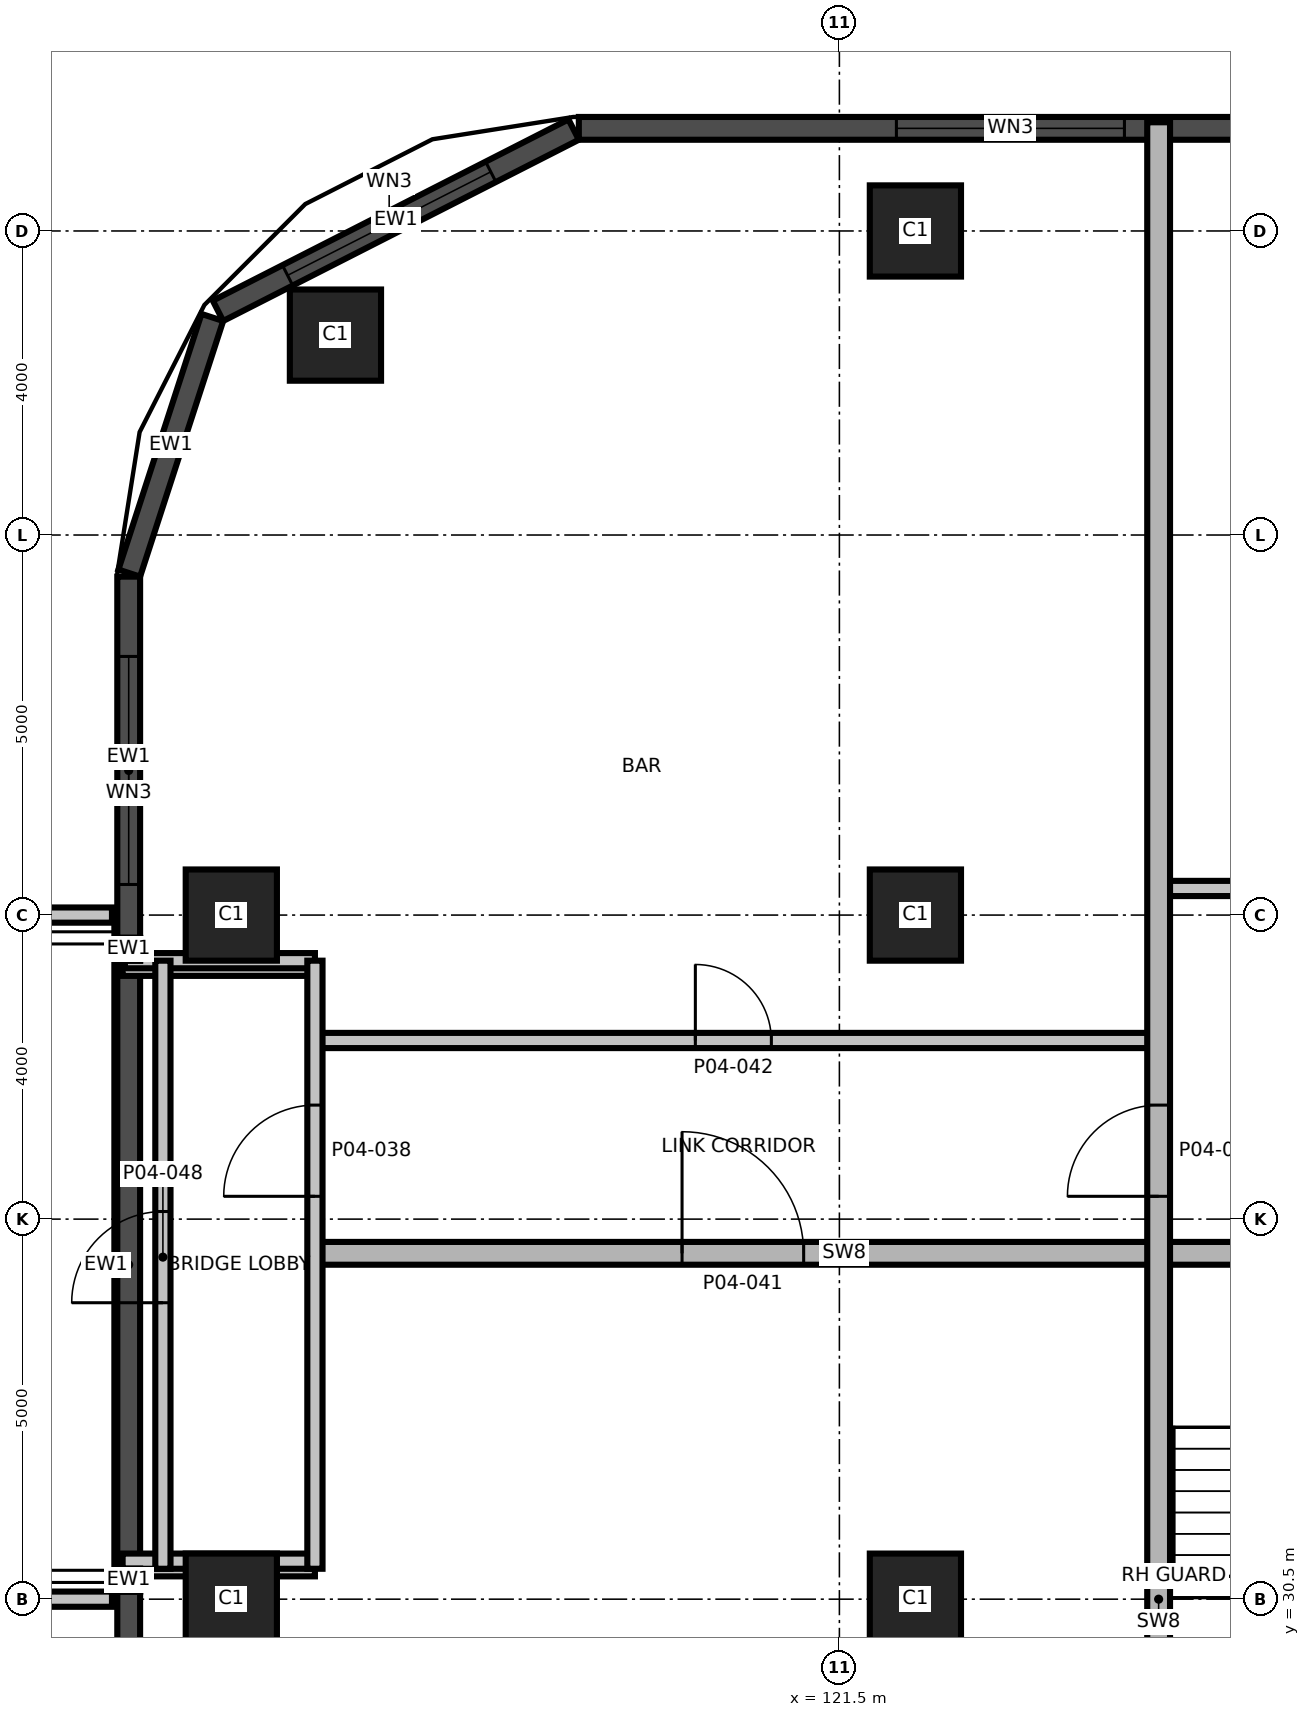
"""IFC4 building model, lengths in metres.
Left out: names, types, materials, properties, quantities, classifications, styles, units other than length and angle.
Written with IfcOpenShell. Run it as: python <this file> out.ifc"""

import sys

from ifc_helpers import new_model, si_unit, direction, frame, frame_2d, origin, origin_2d, place, context, subcontext, project, spatial, rectangle, extrude, element, fill, save


model = new_model("IFC4")
c1 = context("Model", 3, precision=1e-05, world=origin(), true_north=direction((0.0, 1.0)))
c2 = subcontext(c1, "Body", "Model", "MODEL_VIEW")
j1 = project(units=[si_unit("LENGTHUNIT", "METRE"), si_unit("PLANEANGLEUNIT", "RADIAN")], contexts=[c1])
p1 = place(None, origin())
s1 = spatial("IfcSite", under=j1, at=p1, CompositionType="ELEMENT")
p2 = place(p1, origin())
s2 = spatial("IfcBuilding", under=s1, at=p2, CompositionType="ELEMENT")
p3 = place(p2, frame((0.0, 0.0, 23.5)))
s3 = spatial("IfcBuildingStorey", under=s2, at=p3, CompositionType="ELEMENT", Elevation=23.5)
for number, where, z_axis, x_axis in (
    (1, (113.5, 30.5, 0.0), (0.0, 0.0, 1.0), (1.0, 0.0, 0.0)),
    (2, (122.5, 30.5, 0.0), (0.0, 0.0, 1.0), (1.0, 0.0, 0.0)),
    (3, (113.5, 39.5, 0.0), (0.0, 0.0, 1.0), (1.0, 0.0, 0.0)),
    (4, (122.5, 39.5, 0.0), (0.0, 0.0, 1.0), (1.0, 0.0, 0.0)),
    (5, (114.87, 47.13, 0.0), (0.0, 0.0, 1.0), (1.0, 0.0, 0.0)),
    (6, (122.5, 48.5, 0.0), (0.0, 0.0, 1.0), (1.0, 0.0, 0.0)),
):
    element("IfcColumn", number, at=place(p3, frame(where, z_axis=z_axis, x_axis=x_axis)), inside=s3, PredefinedType="COLUMN", context=c2, shape_type="SweptSolid", body=[
        extrude(rectangle(XDim=1.2, YDim=1.2, at=origin_2d()), origin(), (0.0, 0.0, 1.0), 5.0),
    ])
p4 = place(p3, frame((153.952, 49.85, 0.0), z_axis=(0.0, 0.0, 1.0), x_axis=(-1.0, 0.0, 0.0)))
e7 = element("IfcWall", 7, at=p4, inside=s3, PredefinedType="SOLIDWALL", context=c2, shape_type="SweptSolid", body=[
    extrude(rectangle(XDim=35.88, YDim=0.3, at=frame_2d((17.94, 0.0))), origin(), (0.0, 0.0, 1.0), 4.7),
])
p5 = place(p4, frame((1.226, 0.0, 0.9)))
e8 = element("IfcOpeningElement", 8, at=p5, cuts=e7, PredefinedType="OPENING", context=c2, shape_type="SweptSolid", body=[
    extrude(rectangle(XDim=3.0, YDim=2.4, at=frame_2d((1.5, 1.2))), frame((0.0, 0.16, 0.0), z_axis=(0.0, -1.0, 0.0), x_axis=(1.0, 0.0, 0.0)), (0.0, 0.0, 1.0), 0.32),
])
p6 = place(p4, frame((10.702, 0.0, 0.9)))
e9 = element("IfcOpeningElement", 9, at=p6, cuts=e7, PredefinedType="OPENING", context=c2, shape_type="SweptSolid", body=[
    extrude(rectangle(XDim=3.0, YDim=2.4, at=frame_2d((1.5, 1.2))), frame((0.0, 0.16, 0.0), z_axis=(0.0, -1.0, 0.0), x_axis=(1.0, 0.0, 0.0)), (0.0, 0.0, 1.0), 0.32),
])
p7 = place(p4, frame((15.202, 0.0, 0.9)))
e10 = element("IfcOpeningElement", 10, at=p7, cuts=e7, PredefinedType="OPENING", context=c2, shape_type="SweptSolid", body=[
    extrude(rectangle(XDim=3.0, YDim=2.4, at=frame_2d((1.5, 1.2))), frame((0.0, 0.16, 0.0), z_axis=(0.0, -1.0, 0.0), x_axis=(1.0, 0.0, 0.0)), (0.0, 0.0, 1.0), 0.32),
])
p8 = place(p4, frame((19.702, 0.0, 0.9)))
e11 = element("IfcOpeningElement", 11, at=p8, cuts=e7, PredefinedType="OPENING", context=c2, shape_type="SweptSolid", body=[
    extrude(rectangle(XDim=3.0, YDim=2.4, at=frame_2d((1.5, 1.2))), frame((0.0, 0.16, 0.0), z_axis=(0.0, -1.0, 0.0), x_axis=(1.0, 0.0, 0.0)), (0.0, 0.0, 1.0), 0.32),
])
p9 = place(p4, frame((24.202, 0.0, 0.9)))
e12 = element("IfcOpeningElement", 12, at=p9, cuts=e7, PredefinedType="OPENING", context=c2, shape_type="SweptSolid", body=[
    extrude(rectangle(XDim=3.0, YDim=2.4, at=frame_2d((1.5, 1.2))), frame((0.0, 0.16, 0.0), z_axis=(0.0, -1.0, 0.0), x_axis=(1.0, 0.0, 0.0)), (0.0, 0.0, 1.0), 0.32),
])
p10 = place(p4, frame((28.702, 0.0, 0.9)))
e13 = element("IfcOpeningElement", 13, at=p10, cuts=e7, PredefinedType="OPENING", context=c2, shape_type="SweptSolid", body=[
    extrude(rectangle(XDim=3.0, YDim=2.4, at=frame_2d((1.5, 1.2))), frame((0.0, 0.16, 0.0), z_axis=(0.0, -1.0, 0.0), x_axis=(1.0, 0.0, 0.0)), (0.0, 0.0, 1.0), 0.32),
])
p11 = place(p3, frame((118.004, 49.834, 0.0), z_axis=(0.0, 0.0, 1.0), x_axis=(-0.890998339455, -0.454006562826, 0.0)))
e14 = element("IfcWall", 14, at=p11, inside=s3, PredefinedType="SOLIDWALL", context=c2, shape_type="SweptSolid", body=[
    extrude(rectangle(XDim=5.252, YDim=0.3, at=frame_2d((2.626, 0.0))), origin(), (0.0, 0.0, 1.0), 4.7),
])
p12 = place(p11, frame((1.224, 0.0, 0.9)))
e15 = element("IfcOpeningElement", 15, at=p12, cuts=e14, PredefinedType="OPENING", context=c2, shape_type="SweptSolid", body=[
    extrude(rectangle(XDim=3.0, YDim=2.4, at=frame_2d((1.5, 1.2))), frame((0.0, 0.16, 0.0), z_axis=(0.0, -1.0, 0.0), x_axis=(1.0, 0.0, 0.0)), (0.0, 0.0, 1.0), 0.32),
])
p13 = place(p3, frame((113.25, 47.362, 0.0), z_axis=(0.0, 0.0, 1.0), x_axis=(-0.309073584194, -0.951038127287, 0.0)))
e16 = element("IfcWall", 16, at=p13, inside=s3, PredefinedType="SOLIDWALL", context=c2, shape_type="SweptSolid", body=[
    extrude(rectangle(XDim=3.536, YDim=0.3, at=frame_2d((1.768, 0.0))), origin(), (0.0, 0.0, 1.0), 4.7),
])
p14 = place(p3, frame((112.15, 38.9, 3.15), z_axis=(0.0, 0.0, 1.0), x_axis=(0.0, -1.0, 0.0)))
e17 = element("IfcWall", 17, at=p14, inside=s3, PredefinedType="SOLIDWALL", context=c2, shape_type="SweptSolid", body=[
    extrude(rectangle(XDim=8.0, YDim=0.3, at=frame_2d((4.0, 0.0))), origin(), (0.0, 0.0, 1.0), 1.55),
])
p15 = place(p3, frame((112.15, 43.952, 0.0), z_axis=(0.0, 0.0, 1.0), x_axis=(0.0, -1.0, 0.0)))
e18 = element("IfcWall", 18, at=p15, inside=s3, PredefinedType="SOLIDWALL", context=c2, shape_type="SweptSolid", body=[
    extrude(rectangle(XDim=4.752, YDim=0.3, at=frame_2d((2.376, 0.0))), origin(), (0.0, 0.0, 1.0), 4.7),
])
p16 = place(p15, frame((1.05, 0.0, 0.9)))
e19 = element("IfcOpeningElement", 19, at=p16, cuts=e18, PredefinedType="OPENING", context=c2, shape_type="SweptSolid", body=[
    extrude(rectangle(XDim=3.0, YDim=2.4, at=frame_2d((1.5, 1.2))), frame((0.0, 0.16, 0.0), z_axis=(0.0, -1.0, 0.0), x_axis=(1.0, 0.0, 0.0)), (0.0, 0.0, 1.0), 0.32),
])
p17 = place(p3, frame((112.15, 30.6, 0.0), z_axis=(0.0, 0.0, 1.0), x_axis=(0.0, -1.0, 0.0)))
e20 = element("IfcWall", 20, at=p17, inside=s3, PredefinedType="SOLIDWALL", context=c2, shape_type="SweptSolid", body=[
    extrude(rectangle(XDim=13.528, YDim=0.3, at=frame_2d((6.764, 0.0))), origin(), (0.0, 0.0, 1.0), 4.7),
])
p18 = place(p17, frame((0.676, 0.0, 0.9)))
e21 = element("IfcOpeningElement", 21, at=p18, cuts=e20, PredefinedType="OPENING", context=c2, shape_type="SweptSolid", body=[
    extrude(rectangle(XDim=3.0, YDim=2.4, at=frame_2d((1.5, 1.2))), frame((0.0, 0.16, 0.0), z_axis=(0.0, -1.0, 0.0), x_axis=(1.0, 0.0, 0.0)), (0.0, 0.0, 1.0), 0.32),
])
p19 = place(p17, frame((5.376, 0.0, 0.9)))
e22 = element("IfcOpeningElement", 22, at=p19, cuts=e20, PredefinedType="OPENING", context=c2, shape_type="SweptSolid", body=[
    extrude(rectangle(XDim=3.0, YDim=2.4, at=frame_2d((1.5, 1.2))), frame((0.0, 0.16, 0.0), z_axis=(0.0, -1.0, 0.0), x_axis=(1.0, 0.0, 0.0)), (0.0, 0.0, 1.0), 0.32),
])
p20 = place(p17, frame((9.876, 0.0, 0.9)))
e23 = element("IfcOpeningElement", 23, at=p20, cuts=e20, PredefinedType="OPENING", context=c2, shape_type="SweptSolid", body=[
    extrude(rectangle(XDim=3.0, YDim=2.4, at=frame_2d((1.5, 1.2))), frame((0.0, 0.16, 0.0), z_axis=(0.0, -1.0, 0.0), x_axis=(1.0, 0.0, 0.0)), (0.0, 0.0, 1.0), 0.32),
])
p21 = place(p3, frame((105.07, 30.5, 0.0), z_axis=(0.0, 0.0, 1.0), x_axis=(1.0, 0.0, 0.0)))
e24 = element("IfcWall", 24, at=p21, inside=s3, PredefinedType="PARTITIONING", context=c2, shape_type="SweptSolid", body=[
    extrude(rectangle(XDim=6.86, YDim=0.2, at=frame_2d((3.43, 0.0))), origin(), (0.0, 0.0, 1.0), 4.7),
])
p22 = place(p3, frame((112.1, 30.9, 0.0), z_axis=(0.0, 0.0, 1.0), x_axis=(1.0, 0.0, 0.0)))
e25 = element("IfcWall", 25, at=p22, inside=s3, PredefinedType="PARTITIONING", context=c2, shape_type="SweptSolid", body=[
    extrude(rectangle(XDim=2.5, YDim=0.2, at=frame_2d((1.25, 0.0))), origin(), (0.0, 0.0, 1.0), 2.7),
])
p23 = place(p3, frame((112.07, 31.0, 0.0), z_axis=(0.0, 0.0, 1.0), x_axis=(1.0, 0.0, 0.0)))
e26 = element("IfcWall", 26, at=p23, inside=s3, PredefinedType="PARTITIONING", context=c2, shape_type="SweptSolid", body=[
    extrude(rectangle(XDim=2.53, YDim=0.2, at=frame_2d((1.265, 0.0))), origin(), (0.0, 0.0, 1.0), 4.7),
])
p24 = place(p3, frame((114.6, 35.05, 0.0), z_axis=(0.0, 0.0, 1.0), x_axis=(1.0, 0.0, 0.0)))
e27 = element("IfcWall", 27, at=p24, inside=s3, PredefinedType="SHEAR", context=c2, shape_type="SweptSolid", body=[
    extrude(rectangle(XDim=13.93, YDim=0.3, at=frame_2d((6.965, 0.0))), origin(), (0.0, 0.0, 1.0), 4.7),
])
p25 = place(p24, frame((4.83, 0.0, 0.0)))
e28 = element("IfcOpeningElement", 28, at=p25, cuts=e27, PredefinedType="OPENING", context=c2, shape_type="SweptSolid", body=[
    extrude(rectangle(XDim=1.6, YDim=2.1, at=frame_2d((0.8, 1.05))), frame((0.0, 0.16, 0.0), z_axis=(0.0, -1.0, 0.0), x_axis=(1.0, 0.0, 0.0)), (0.0, 0.0, 1.0), 0.32),
])
p26 = place(p3, frame((114.6, 37.85, 0.0), z_axis=(0.0, 0.0, 1.0), x_axis=(1.0, 0.0, 0.0)))
e29 = element("IfcWall", 29, at=p26, inside=s3, PredefinedType="PARTITIONING", context=c2, shape_type="SweptSolid", body=[
    extrude(rectangle(XDim=11.15, YDim=0.2, at=frame_2d((5.575, 0.0))), origin(), (0.0, 0.0, 1.0), 4.7),
])
p27 = place(p26, frame((5.005, 0.0, 0.0)))
e30 = element("IfcOpeningElement", 30, at=p27, cuts=e29, PredefinedType="OPENING", context=c2, shape_type="SweptSolid", body=[
    extrude(rectangle(XDim=1.0, YDim=2.1, at=frame_2d((0.5, 1.05))), frame((0.0, 0.11, 0.0), z_axis=(0.0, -1.0, 0.0), x_axis=(1.0, 0.0, 0.0)), (0.0, 0.0, 1.0), 0.22),
])
p28 = place(p3, frame((112.07, 38.8, 0.0), z_axis=(0.0, 0.0, 1.0), x_axis=(1.0, 0.0, 0.0)))
e31 = element("IfcWall", 31, at=p28, inside=s3, PredefinedType="PARTITIONING", context=c2, shape_type="SweptSolid", body=[
    extrude(rectangle(XDim=2.53, YDim=0.2, at=frame_2d((1.265, 0.0))), origin(), (0.0, 0.0, 1.0), 4.7),
])
p29 = place(p3, frame((112.1, 38.9, 0.0), z_axis=(0.0, 0.0, 1.0), x_axis=(1.0, 0.0, 0.0)))
e32 = element("IfcWall", 32, at=p29, inside=s3, PredefinedType="PARTITIONING", context=c2, shape_type="SweptSolid", body=[
    extrude(rectangle(XDim=2.5, YDim=0.2, at=frame_2d((1.25, 0.0))), origin(), (0.0, 0.0, 1.0), 2.7),
])
p30 = place(p3, frame((105.07, 39.5, 0.0), z_axis=(0.0, 0.0, 1.0), x_axis=(1.0, 0.0, 0.0)))
e33 = element("IfcWall", 33, at=p30, inside=s3, PredefinedType="PARTITIONING", context=c2, shape_type="SweptSolid", body=[
    extrude(rectangle(XDim=6.86, YDim=0.2, at=frame_2d((3.43, 0.0))), origin(), (0.0, 0.0, 1.0), 4.7),
])
p31 = place(p3, frame((125.75, 39.85, 0.0), z_axis=(0.0, 0.0, 1.0), x_axis=(1.0, 0.0, 0.0)))
e34 = element("IfcWall", 34, at=p31, inside=s3, PredefinedType="PARTITIONING", context=c2, shape_type="SweptSolid", body=[
    extrude(rectangle(XDim=3.25, YDim=0.2, at=frame_2d((1.625, 0.0))), origin(), (0.0, 0.0, 1.0), 4.7),
])
p32 = place(p3, frame((112.6, 30.9, 0.0), z_axis=(0.0, 0.0, 1.0), x_axis=(0.0, 1.0, 0.0)))
e35 = element("IfcWall", 35, at=p32, inside=s3, PredefinedType="PARTITIONING", context=c2, shape_type="SweptSolid", body=[
    extrude(rectangle(XDim=8.0, YDim=0.2, at=frame_2d((4.0, 0.0))), origin(), (0.0, 0.0, 1.0), 4.7),
])
p33 = place(p32, frame((3.5, 0.0, 0.0)))
e36 = element("IfcOpeningElement", 36, at=p33, cuts=e35, PredefinedType="OPENING", context=c2, shape_type="SweptSolid", body=[
    extrude(rectangle(XDim=1.2, YDim=2.1, at=frame_2d((0.6, 1.05))), frame((0.0, 0.11, 0.0), z_axis=(0.0, -1.0, 0.0), x_axis=(1.0, 0.0, 0.0)), (0.0, 0.0, 1.0), 0.22),
])
p34 = place(p3, frame((114.6, 30.9, 0.0), z_axis=(0.0, 0.0, 1.0), x_axis=(0.0, 1.0, 0.0)))
e37 = element("IfcWall", 37, at=p34, inside=s3, PredefinedType="PARTITIONING", context=c2, shape_type="SweptSolid", body=[
    extrude(rectangle(XDim=8.0, YDim=0.2, at=frame_2d((4.0, 0.0))), origin(), (0.0, 0.0, 1.0), 4.7),
])
p35 = place(p34, frame((4.9, 0.0, 0.0)))
e38 = element("IfcOpeningElement", 38, at=p35, cuts=e37, PredefinedType="OPENING", context=c2, shape_type="SweptSolid", body=[
    extrude(rectangle(XDim=1.2, YDim=2.1, at=frame_2d((0.6, 1.05))), frame((0.0, 0.11, 0.0), z_axis=(0.0, -1.0, 0.0), x_axis=(1.0, 0.0, 0.0)), (0.0, 0.0, 1.0), 0.22),
])
p36 = place(p3, frame((125.7, 11.07, 0.0), z_axis=(0.0, 0.0, 1.0), x_axis=(0.0, 1.0, 0.0)))
e39 = element("IfcWall", 39, at=p36, inside=s3, PredefinedType="SHEAR", context=c2, shape_type="SweptSolid", body=[
    extrude(rectangle(XDim=38.86, YDim=0.3, at=frame_2d((19.43, 0.0))), origin(), (0.0, 0.0, 1.0), 4.7),
])
p37 = place(p36, frame((24.73, 0.0, 0.0)))
e40 = element("IfcOpeningElement", 40, at=p37, cuts=e39, PredefinedType="OPENING", context=c2, shape_type="SweptSolid", body=[
    extrude(rectangle(XDim=1.2, YDim=2.1, at=frame_2d((0.6, 1.05))), frame((0.0, 0.16, 0.0), z_axis=(0.0, -1.0, 0.0), x_axis=(1.0, 0.0, 0.0)), (0.0, 0.0, 1.0), 0.32),
])
p38 = place(p3, frame((112.15, 39.2, 0.0), z_axis=(0.0, 0.0, 1.0), x_axis=(0.0, -1.0, 0.0)))
e41 = element("IfcWall", 41, at=p38, inside=s3, PredefinedType="SOLIDWALL", context=c2, shape_type="SweptSolid", body=[
    extrude(rectangle(XDim=0.3, YDim=0.3, at=frame_2d((0.15, 0.0))), origin(), (0.0, 0.0, 1.0), 2.7),
])
p39 = place(p3, frame((112.15, 39.2, 3.15), z_axis=(0.0, 0.0, 1.0), x_axis=(0.0, -1.0, 0.0)))
e42 = element("IfcWall", 42, at=p39, inside=s3, PredefinedType="SOLIDWALL", context=c2, shape_type="SweptSolid", body=[
    extrude(rectangle(XDim=0.3, YDim=0.3, at=frame_2d((0.15, 0.0))), origin(), (0.0, 0.0, 1.0), 1.55),
])
p40 = place(p3, frame((112.15, 30.6, 0.0), z_axis=(0.0, 0.0, 1.0), x_axis=(0.0, 1.0, 0.0)))
e43 = element("IfcWall", 43, at=p40, inside=s3, PredefinedType="SOLIDWALL", context=c2, shape_type="SweptSolid", body=[
    extrude(rectangle(XDim=0.3, YDim=0.3, at=frame_2d((0.15, 0.0))), origin(), (0.0, 0.0, 1.0), 2.7),
])
p41 = place(p3, frame((112.15, 30.6, 3.15), z_axis=(0.0, 0.0, 1.0), x_axis=(0.0, 1.0, 0.0)))
e44 = element("IfcWall", 44, at=p41, inside=s3, PredefinedType="SOLIDWALL", context=c2, shape_type="SweptSolid", body=[
    extrude(rectangle(XDim=0.3, YDim=0.3, at=frame_2d((0.15, 0.0))), origin(), (0.0, 0.0, 1.0), 1.55),
])
p42 = place(p10, origin())
e45 = element("IfcWindow", 45, at=p42, inside=s3, PartitioningType="SINGLE_PANEL", PredefinedType="WINDOW", context=c2, shape_type="SweptSolid", body=[
    extrude(rectangle(XDim=3.0, YDim=2.4, at=frame_2d((1.5, 1.2))), frame((0.0, 0.03, 0.0), z_axis=(0.0, -1.0, 0.0), x_axis=(1.0, 0.0, 0.0)), (0.0, 0.0, 1.0), 0.06),
])
fill(e13, e45)
p43 = place(p12, origin())
e46 = element("IfcWindow", 46, at=p43, inside=s3, PartitioningType="SINGLE_PANEL", PredefinedType="WINDOW", context=c2, shape_type="SweptSolid", body=[
    extrude(rectangle(XDim=3.0, YDim=2.4, at=frame_2d((1.5, 1.2))), frame((0.0, 0.03, 0.0), z_axis=(0.0, -1.0, 0.0), x_axis=(1.0, 0.0, 0.0)), (0.0, 0.0, 1.0), 0.06),
])
fill(e15, e46)
p44 = place(p16, origin())
e47 = element("IfcWindow", 47, at=p44, inside=s3, PartitioningType="SINGLE_PANEL", PredefinedType="WINDOW", context=c2, shape_type="SweptSolid", body=[
    extrude(rectangle(XDim=3.0, YDim=2.4, at=frame_2d((1.5, 1.2))), frame((0.0, 0.03, 0.0), z_axis=(0.0, -1.0, 0.0), x_axis=(1.0, 0.0, 0.0)), (0.0, 0.0, 1.0), 0.06),
])
fill(e19, e47)
p45 = place(p35, origin())
e48 = element("IfcDoor", 48, at=p45, inside=s3, OperationType="SINGLE_SWING_RIGHT", PredefinedType="DOOR", context=c2, shape_type="SweptSolid", body=[
    extrude(rectangle(XDim=1.2, YDim=2.1, at=frame_2d((0.6, 1.05))), frame((0.0, 0.025, 0.0), z_axis=(0.0, -1.0, 0.0), x_axis=(1.0, 0.0, 0.0)), (0.0, 0.0, 1.0), 0.05),
])
fill(e38, e48)
p46 = place(p37, origin())
e49 = element("IfcDoor", 49, at=p46, inside=s3, OperationType="SINGLE_SWING_LEFT", PredefinedType="DOOR", context=c2, shape_type="SweptSolid", body=[
    extrude(rectangle(XDim=1.2, YDim=2.1, at=frame_2d((0.6, 1.05))), frame((0.0, 0.025, 0.0), z_axis=(0.0, -1.0, 0.0), x_axis=(1.0, 0.0, 0.0)), (0.0, 0.0, 1.0), 0.05),
])
fill(e40, e49)
p47 = place(p25, origin())
e50 = element("IfcDoor", 50, at=p47, inside=s3, OperationType="SINGLE_SWING_LEFT", PredefinedType="DOOR", context=c2, shape_type="SweptSolid", body=[
    extrude(rectangle(XDim=1.6, YDim=2.1, at=frame_2d((0.8, 1.05))), frame((0.0, 0.025, 0.0), z_axis=(0.0, -1.0, 0.0), x_axis=(1.0, 0.0, 0.0)), (0.0, 0.0, 1.0), 0.05),
])
fill(e28, e50)
p48 = place(p27, origin())
e51 = element("IfcDoor", 51, at=p48, inside=s3, OperationType="SINGLE_SWING_RIGHT", PredefinedType="DOOR", context=c2, shape_type="SweptSolid", body=[
    extrude(rectangle(XDim=1.0, YDim=2.1, at=frame_2d((0.5, 1.05))), frame((0.0, 0.025, 0.0), z_axis=(0.0, -1.0, 0.0), x_axis=(1.0, 0.0, 0.0)), (0.0, 0.0, 1.0), 0.05),
])
fill(e30, e51)
p49 = place(p33, origin())
e52 = element("IfcDoor", 52, at=p49, inside=s3, OperationType="SINGLE_SWING_RIGHT", PredefinedType="DOOR", context=c2, shape_type="SweptSolid", body=[
    extrude(rectangle(XDim=1.2, YDim=2.1, at=frame_2d((0.6, 1.05))), frame((0.0, 0.025, 0.0), z_axis=(0.0, -1.0, 0.0), x_axis=(1.0, 0.0, 0.0)), (0.0, 0.0, 1.0), 0.05),
])
fill(e36, e52)
save(model, sys.argv[1])
